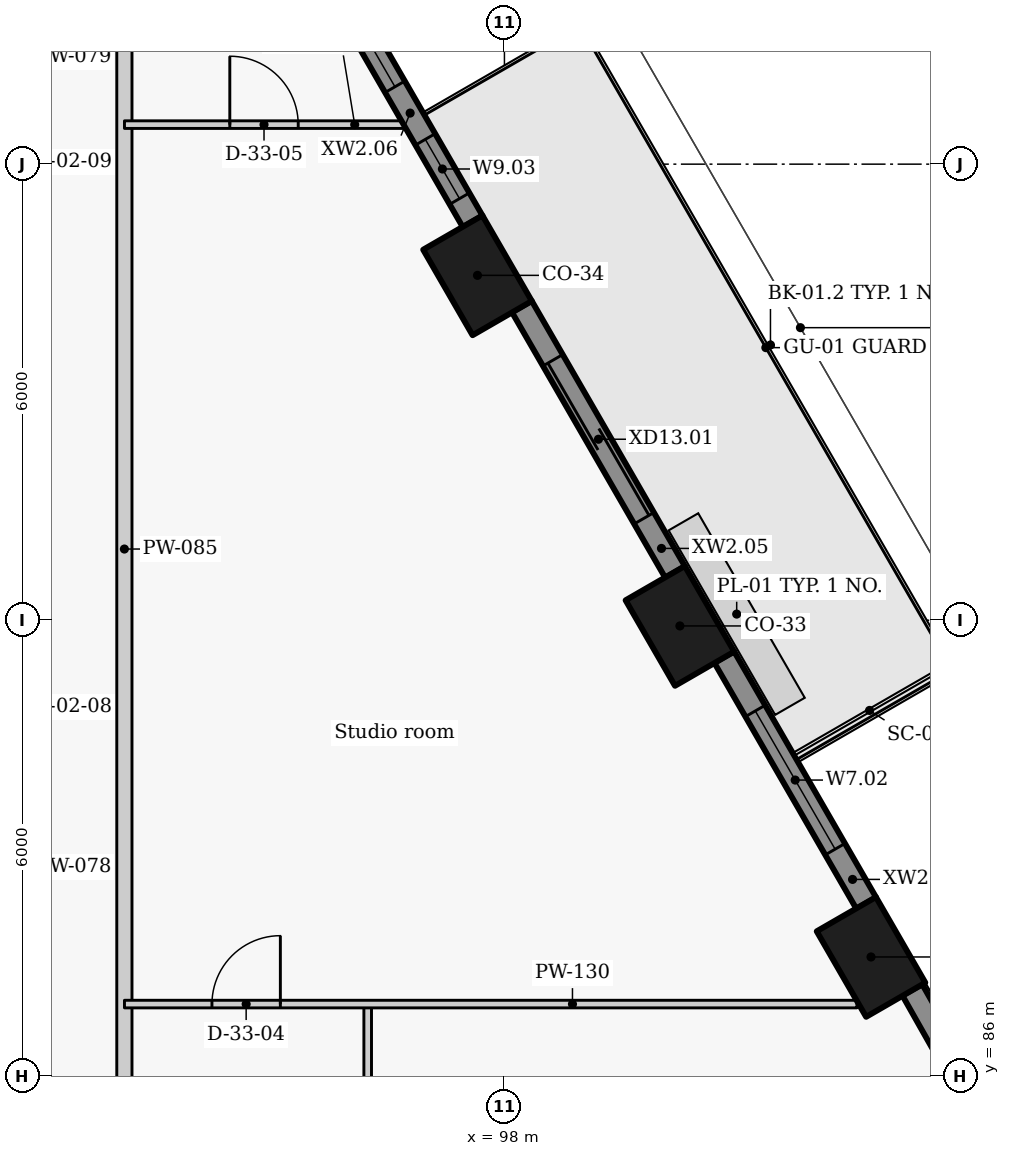
"""IFC4 building model, lengths in metres.
Left out: names, types, materials, properties, quantities, classifications, styles, units other than length and angle.
Written with IfcOpenShell. Run it as: python <this file> out.ifc"""

import sys

from ifc_helpers import new_model, si_unit, direction, frame, frame_2d, origin, origin_2d, place, context, subcontext, project, spatial, rectangle, extrude, element, fill, save


model = new_model("IFC4")
c1 = context("Model", 3, precision=1e-05, world=origin(), true_north=direction((0.0, 1.0)))
c2 = subcontext(c1, "Body", "Model", "MODEL_VIEW")
j1 = project(units=[si_unit("LENGTHUNIT", "METRE"), si_unit("PLANEANGLEUNIT", "RADIAN")], contexts=[c1])
p1 = place(None, origin())
s1 = spatial("IfcSite", under=j1, at=p1, CompositionType="ELEMENT")
p2 = place(p1, origin())
s2 = spatial("IfcBuilding", under=s1, at=p2, CompositionType="ELEMENT")
p3 = place(p2, frame((0.0, 0.0, 160.2)))
s3 = spatial("IfcBuildingStorey", under=s2, at=p3, CompositionType="ELEMENT", Elevation=160.2)
for number, where, z_axis, x_axis in (
    (1, (102.823, 87.57, 0.0), (0.0, 0.0, 1.0), (-0.5, 0.866, 0.0)),
    (2, (100.308, 91.925, 0.0), (0.0, 0.0, 1.0), (-0.5, 0.866, 0.0)),
    (3, (97.646, 96.537, 0.0), (0.0, 0.0, 1.0), (-0.5, 0.866, 0.0)),
):
    element("IfcColumn", number, at=place(p3, frame(where, z_axis=z_axis, x_axis=x_axis)), inside=s3, PredefinedType="COLUMN", context=c2, shape_type="SweptSolid", body=[
        extrude(rectangle(XDim=1.3, YDim=0.9, at=origin_2d()), origin(), (0.0, 0.0, 1.0), 3.3),
    ])
p4 = place(p3, frame((106.186, 82.153, 0.0), z_axis=(0.0, 0.0, 1.0), x_axis=(-0.492498306264, 0.87031340236, 0.0)))
e4 = element("IfcWall", 4, at=p4, inside=s3, PredefinedType="SOLIDWALL", context=c2, shape_type="SweptSolid", body=[
    extrude(rectangle(XDim=5.727, YDim=0.3, at=frame_2d((2.863, 0.0))), origin(), (0.0, 0.0, 1.0), 2.425),
])
p5 = place(p4, frame((2.604, 0.0, 0.9)))
e5 = element("IfcOpeningElement", 5, at=p5, cuts=e4, PredefinedType="OPENING", context=c2, shape_type="SweptSolid", body=[
    extrude(rectangle(XDim=2.1, YDim=1.1, at=frame_2d((1.05, 0.55))), frame((0.0, 0.16, 0.0), z_axis=(0.0, -1.0, 0.0), x_axis=(1.0, 0.0, 0.0)), (0.0, 0.0, 1.0), 0.32),
])
p6 = place(p3, frame((102.76, 88.279, 0.0), z_axis=(0.0, 0.0, 1.0), x_axis=(-0.499933594891, 0.866063739398, 0.0)))
e6 = element("IfcWall", 6, at=p6, inside=s3, PredefinedType="SOLIDWALL", context=c2, shape_type="SweptSolid", body=[
    extrude(rectangle(XDim=3.737, YDim=0.3, at=frame_2d((1.868, 0.0))), origin(), (0.0, 0.0, 1.0), 2.425),
])
p7 = place(p6, frame((0.818, 0.0, 0.9)))
e7 = element("IfcOpeningElement", 7, at=p7, cuts=e6, PredefinedType="OPENING", context=c2, shape_type="SweptSolid", body=[
    extrude(rectangle(XDim=2.1, YDim=1.1, at=frame_2d((1.05, 0.55))), frame((0.0, 0.16, 0.0), z_axis=(0.0, -1.0, 0.0), x_axis=(1.0, 0.0, 0.0)), (0.0, 0.0, 1.0), 0.32),
])
p8 = place(p3, frame((100.245, 92.634, 0.0), z_axis=(0.0, 0.0, 1.0), x_axis=(-0.500031546601, 0.86600718958, 0.0)))
e8 = element("IfcWall", 8, at=p8, inside=s3, PredefinedType="SOLIDWALL", context=c2, shape_type="SweptSolid", body=[
    extrude(rectangle(XDim=4.034, YDim=0.3, at=frame_2d((2.017, 0.0))), origin(), (0.0, 0.0, 1.0), 2.425),
])
p9 = place(p8, frame((0.817, 0.0, 0.0)))
e9 = element("IfcOpeningElement", 9, at=p9, cuts=e8, PredefinedType="OPENING", context=c2, shape_type="SweptSolid", body=[
    extrude(rectangle(XDim=2.4, YDim=2.0, at=frame_2d((1.2, 1.0))), frame((0.0, 0.16, 0.0), z_axis=(0.0, -1.0, 0.0), x_axis=(1.0, 0.0, 0.0)), (0.0, 0.0, 1.0), 0.32),
])
p10 = place(p3, frame((97.582, 97.247, 0.0), z_axis=(0.0, 0.0, 1.0), x_axis=(-0.500018589245, 0.866014671013, 0.0)))
e10 = element("IfcWall", 10, at=p10, inside=s3, PredefinedType="SOLIDWALL", context=c2, shape_type="SweptSolid", body=[
    extrude(rectangle(XDim=4.068, YDim=0.3, at=frame_2d((2.034, 0.0))), origin(), (0.0, 0.0, 1.0), 2.425),
])
p11 = place(p10, frame((0.346, 0.0, 0.9)))
e11 = element("IfcOpeningElement", 11, at=p11, cuts=e10, PredefinedType="OPENING", context=c2, shape_type="SweptSolid", body=[
    extrude(rectangle(XDim=0.9, YDim=1.1, at=frame_2d((0.45, 0.55))), frame((0.0, 0.16, 0.0), z_axis=(0.0, -1.0, 0.0), x_axis=(1.0, 0.0, 0.0)), (0.0, 0.0, 1.0), 0.32),
])
p12 = place(p10, frame((2.045, 0.0, 0.9)))
e12 = element("IfcOpeningElement", 12, at=p12, cuts=e10, PredefinedType="OPENING", context=c2, shape_type="SweptSolid", body=[
    extrude(rectangle(XDim=1.5, YDim=1.1, at=frame_2d((0.75, 0.55))), frame((0.0, 0.16, 0.0), z_axis=(0.0, -1.0, 0.0), x_axis=(1.0, 0.0, 0.0)), (0.0, 0.0, 1.0), 0.32),
])
p13 = place(p3, frame((93.0, 102.498, 0.0), z_axis=(0.0, 0.0, 1.0), x_axis=(0.0, -1.0, 0.0)))
e13 = element("IfcWall", 13, at=p13, inside=s3, PredefinedType="PARTITIONING", context=c2, shape_type="SweptSolid", body=[
    extrude(rectangle(XDim=45.665, YDim=0.2, at=frame_2d((22.833, 0.0))), origin(), (0.0, 0.0, 1.0), 2.405),
])
p14 = place(p13, frame((37.581, 0.0, 0.0)))
e14 = element("IfcOpeningElement", 14, at=p14, cuts=e13, PredefinedType="OPENING", context=c2, shape_type="SweptSolid", body=[
    extrude(rectangle(XDim=1.0, YDim=2.1, at=frame_2d((0.5, 1.05))), frame((0.0, 0.11, 0.0), z_axis=(0.0, -1.0, 0.0), x_axis=(1.0, 0.0, 0.0)), (0.0, 0.0, 1.0), 0.22),
])
p15 = place(p13, frame((29.223, 0.0, 0.0)))
e15 = element("IfcOpeningElement", 15, at=p15, cuts=e13, PredefinedType="OPENING", context=c2, shape_type="SweptSolid", body=[
    extrude(rectangle(XDim=1.0, YDim=2.1, at=frame_2d((0.5, 1.05))), frame((0.0, 0.11, 0.0), z_axis=(0.0, -1.0, 0.0), x_axis=(1.0, 0.0, 0.0)), (0.0, 0.0, 1.0), 0.22),
])
p16 = place(p13, frame((19.223, 0.0, 0.0)))
e16 = element("IfcOpeningElement", 16, at=p16, cuts=e13, PredefinedType="OPENING", context=c2, shape_type="SweptSolid", body=[
    extrude(rectangle(XDim=1.0, YDim=2.1, at=frame_2d((0.5, 1.05))), frame((0.0, 0.11, 0.0), z_axis=(0.0, -1.0, 0.0), x_axis=(1.0, 0.0, 0.0)), (0.0, 0.0, 1.0), 0.22),
])
p17 = place(p3, frame((96.201, 83.55, 0.0), z_axis=(0.0, 0.0, 1.0), x_axis=(0.0, 1.0, 0.0)))
e17 = element("IfcWall", 17, at=p17, inside=s3, PredefinedType="PARTITIONING", context=c2, shape_type="SweptSolid", body=[
    extrude(rectangle(XDim=3.4, YDim=0.1, at=frame_2d((1.7, 0.0))), origin(), (0.0, 0.0, 1.0), 3.025),
])
p18 = place(p3, frame((93.001, 86.95, 0.0), z_axis=(0.0, 0.0, 1.0), x_axis=(1.0, 0.0, 0.0)))
e18 = element("IfcWall", 18, at=p18, inside=s3, PredefinedType="PARTITIONING", context=c2, shape_type="SweptSolid", body=[
    extrude(rectangle(XDim=9.637, YDim=0.1, at=frame_2d((4.818, 0.0))), origin(), (0.0, 0.0, 1.0), 3.025),
])
p19 = place(p18, frame((1.151, 0.0, 0.0)))
e19 = element("IfcOpeningElement", 19, at=p19, cuts=e18, PredefinedType="OPENING", context=c2, shape_type="SweptSolid", body=[
    extrude(rectangle(XDim=0.9, YDim=2.1, at=frame_2d((0.45, 1.05))), frame((0.0, 0.06, 0.0), z_axis=(0.0, -1.0, 0.0), x_axis=(1.0, 0.0, 0.0)), (0.0, 0.0, 1.0), 0.12),
])
p20 = place(p3, frame((93.001, 98.52, 0.0), z_axis=(0.0, 0.0, 1.0), x_axis=(1.0, 0.0, 0.0)))
e20 = element("IfcWall", 20, at=p20, inside=s3, PredefinedType="PARTITIONING", context=c2, shape_type="SweptSolid", body=[
    extrude(rectangle(XDim=3.673, YDim=0.1, at=frame_2d((1.836, 0.0))), origin(), (0.0, 0.0, 1.0), 2.405),
])
p21 = place(p20, frame((1.386, 0.0, 0.0)))
e21 = element("IfcOpeningElement", 21, at=p21, cuts=e20, PredefinedType="OPENING", context=c2, shape_type="SweptSolid", body=[
    extrude(rectangle(XDim=0.9, YDim=2.1, at=frame_2d((0.45, 1.05))), frame((0.0, 0.06, 0.0), z_axis=(0.0, -1.0, 0.0), x_axis=(1.0, 0.0, 0.0)), (0.0, 0.0, 1.0), 0.12),
])
p22 = place(p7, origin())
e22 = element("IfcWindow", 22, at=p22, inside=s3, PartitioningType="SINGLE_PANEL", PredefinedType="WINDOW", context=c2, shape_type="SweptSolid", body=[
    extrude(rectangle(XDim=2.1, YDim=1.1, at=frame_2d((1.05, 0.55))), frame((0.0, 0.03, 0.0), z_axis=(0.0, -1.0, 0.0), x_axis=(1.0, 0.0, 0.0)), (0.0, 0.0, 1.0), 0.06),
])
fill(e7, e22)
p23 = place(p9, origin())
e23 = element("IfcDoor", 23, at=p23, inside=s3, OperationType="DOUBLE_DOOR_SLIDING", PredefinedType="DOOR", context=c2, shape_type="SweptSolid", body=[
    extrude(rectangle(XDim=2.4, YDim=2.0, at=frame_2d((1.2, 1.0))), frame((0.0, 0.025, 0.0), z_axis=(0.0, -1.0, 0.0), x_axis=(1.0, 0.0, 0.0)), (0.0, 0.0, 1.0), 0.05),
])
fill(e9, e23)
p24 = place(p11, origin())
e24 = element("IfcWindow", 24, at=p24, inside=s3, PartitioningType="SINGLE_PANEL", PredefinedType="WINDOW", context=c2, shape_type="SweptSolid", body=[
    extrude(rectangle(XDim=0.9, YDim=1.1, at=frame_2d((0.45, 0.55))), frame((0.0, 0.03, 0.0), z_axis=(0.0, -1.0, 0.0), x_axis=(1.0, 0.0, 0.0)), (0.0, 0.0, 1.0), 0.06),
])
fill(e11, e24)
p25 = place(p12, origin())
e25 = element("IfcWindow", 25, at=p25, inside=s3, PartitioningType="SINGLE_PANEL", PredefinedType="WINDOW", context=c2, shape_type="SweptSolid", body=[
    extrude(rectangle(XDim=1.5, YDim=1.1, at=frame_2d((0.75, 0.55))), frame((0.0, 0.03, 0.0), z_axis=(0.0, -1.0, 0.0), x_axis=(1.0, 0.0, 0.0)), (0.0, 0.0, 1.0), 0.06),
])
fill(e12, e25)
p26 = place(p19, origin())
e26 = element("IfcDoor", 26, at=p26, inside=s3, OperationType="SINGLE_SWING_RIGHT", PredefinedType="DOOR", context=c2, shape_type="SweptSolid", body=[
    extrude(rectangle(XDim=0.9, YDim=2.1, at=frame_2d((0.45, 1.05))), frame((0.0, 0.025, 0.0), z_axis=(0.0, -1.0, 0.0), x_axis=(1.0, 0.0, 0.0)), (0.0, 0.0, 1.0), 0.05),
])
fill(e19, e26)
p27 = place(p21, origin())
e27 = element("IfcDoor", 27, at=p27, inside=s3, OperationType="SINGLE_SWING_LEFT", PredefinedType="DOOR", context=c2, shape_type="SweptSolid", body=[
    extrude(rectangle(XDim=0.9, YDim=2.1, at=frame_2d((0.45, 1.05))), frame((0.0, 0.025, 0.0), z_axis=(0.0, -1.0, 0.0), x_axis=(1.0, 0.0, 0.0)), (0.0, 0.0, 1.0), 0.05),
])
fill(e21, e27)
save(model, sys.argv[1])
